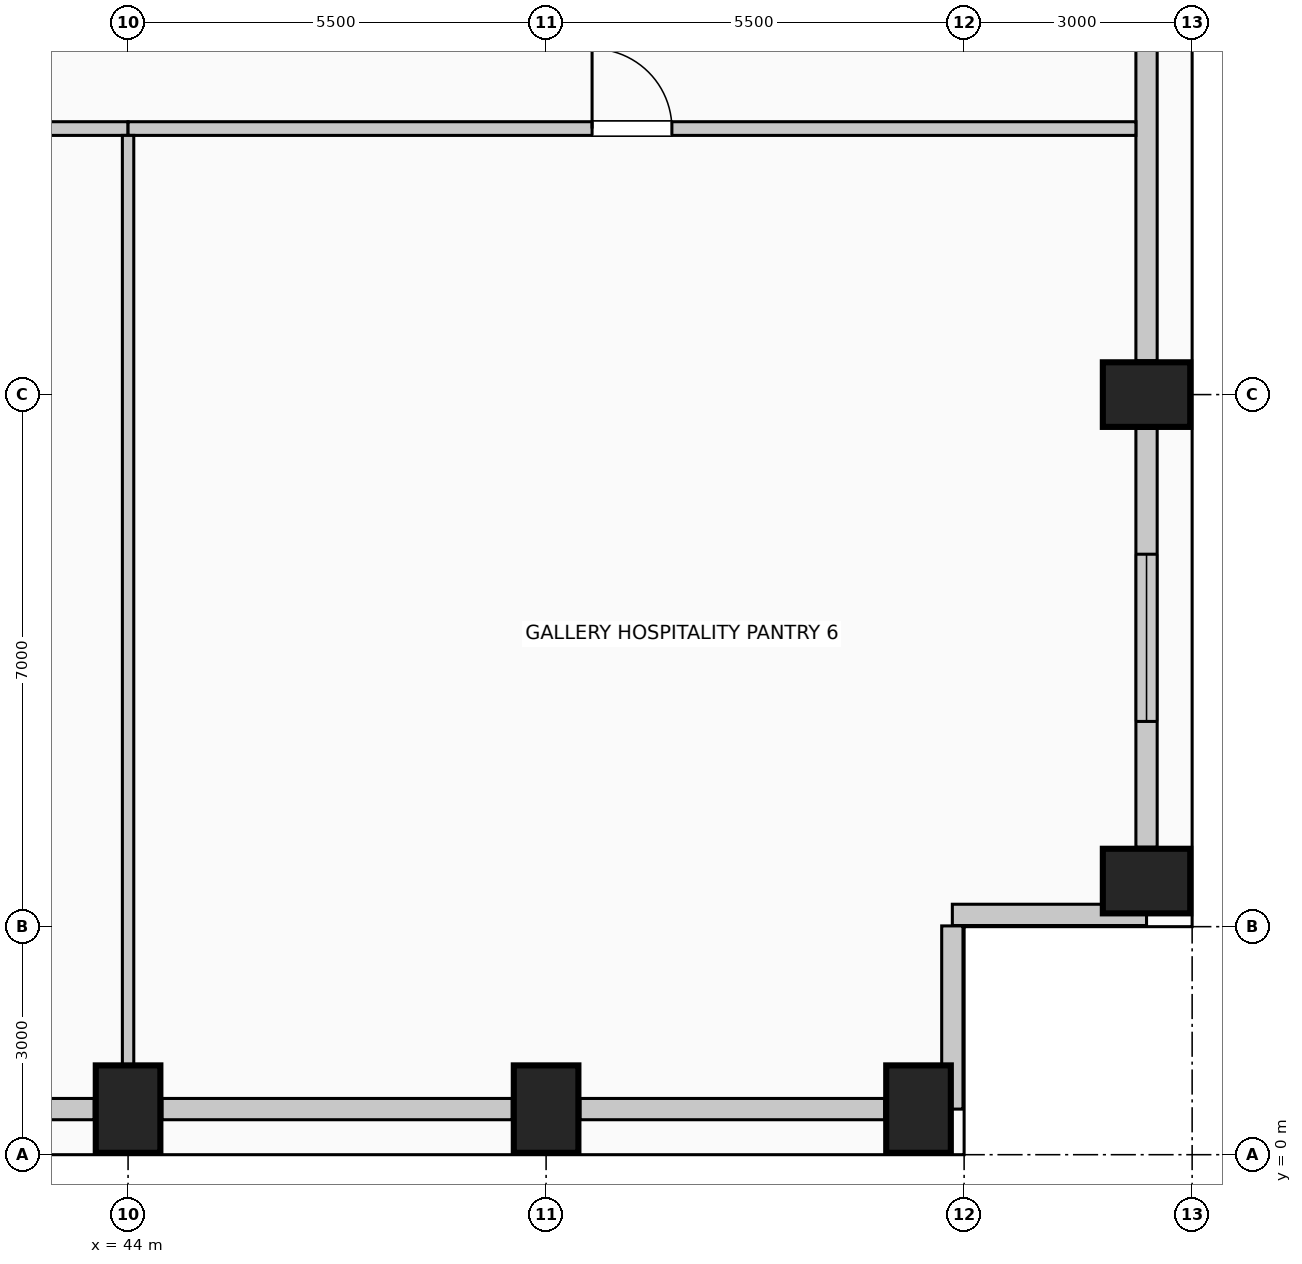
"""IFC4 building model, lengths in metres.
Left out: names, types, materials, properties, quantities, classifications, styles, units other than length and angle.
Written with IfcOpenShell. Run it as: python <this file> out.ifc"""

import sys

from ifc_helpers import new_model, si_unit, direction, frame, frame_2d, origin, origin_2d, place, context, subcontext, project, spatial, rectangle, extrude, element, fill, save


model = new_model("IFC4")
c1 = context("Model", 3, precision=1e-05, world=origin(), true_north=direction((0.0, 1.0)))
c2 = subcontext(c1, "Body", "Model", "MODEL_VIEW")
j1 = project(units=[si_unit("LENGTHUNIT", "METRE"), si_unit("PLANEANGLEUNIT", "RADIAN")], contexts=[c1])
p1 = place(None, origin())
s1 = spatial("IfcSite", under=j1, at=p1, CompositionType="ELEMENT")
p2 = place(p1, origin())
s2 = spatial("IfcBuilding", under=s1, at=p2, CompositionType="ELEMENT")
p3 = place(p2, frame((0.0, 0.0, 140.6)))
s3 = spatial("IfcBuildingStorey", under=s2, at=p3, CompositionType="ELEMENT", Elevation=140.6)
for number, where, z_axis, x_axis in (
    (1, (44.0, 0.6, 0.0), (0.0, 0.0, 1.0), (1.0, 0.0, 0.0)),
    (2, (49.5, 0.6, 0.0), (0.0, 0.0, 1.0), (1.0, 0.0, 0.0)),
    (3, (54.4, 0.6, 0.0), (0.0, 0.0, 1.0), (1.0, 0.0, 0.0)),
    (4, (57.4, 3.6, 0.0), (0.0, 0.0, 1.0), (0.0, 1.0, 0.0)),
    (5, (57.4, 10.0, 0.0), (0.0, 0.0, 1.0), (0.0, 1.0, 0.0)),
):
    element("IfcColumn", number, at=place(p3, frame(where, z_axis=z_axis, x_axis=x_axis)), inside=s3, PredefinedType="COLUMN", context=c2, shape_type="SweptSolid", body=[
        extrude(rectangle(XDim=0.85, YDim=1.15, at=origin_2d()), origin(), (0.0, 0.0, 1.0), 4.0),
    ])
p4 = place(p3, frame((43.555, 0.6, 0.0), z_axis=(0.0, 0.0, 1.0), x_axis=(-1.0, 0.0, 0.0)))
e6 = element("IfcWall", 6, at=p4, inside=s3, PredefinedType="SOLIDWALL", context=c2, shape_type="SweptSolid", body=[
    extrude(rectangle(XDim=1.385, YDim=0.28, at=frame_2d((0.692, 0.0))), origin(), (0.0, 0.0, 1.0), 2.875),
])
p5 = place(p3, frame((49.055, 0.6, 0.0), z_axis=(0.0, 0.0, 1.0), x_axis=(-1.0, 0.0, 0.0)))
e7 = element("IfcWall", 7, at=p5, inside=s3, PredefinedType="SOLIDWALL", context=c2, shape_type="SweptSolid", body=[
    extrude(rectangle(XDim=4.61, YDim=0.28, at=frame_2d((2.305, 0.0))), origin(), (0.0, 0.0, 1.0), 2.875),
])
p6 = place(p3, frame((53.955, 0.6, 0.0), z_axis=(0.0, 0.0, 1.0), x_axis=(-1.0, 0.0, 0.0)))
e8 = element("IfcWall", 8, at=p6, inside=s3, PredefinedType="SOLIDWALL", context=c2, shape_type="SweptSolid", body=[
    extrude(rectangle(XDim=4.01, YDim=0.28, at=frame_2d((2.005, 0.0))), origin(), (0.0, 0.0, 1.0), 2.875),
])
p7 = place(p3, frame((57.4, 9.555, 0.0), z_axis=(0.0, 0.0, 1.0), x_axis=(0.0, -1.0, 0.0)))
e9 = element("IfcWall", 9, at=p7, inside=s3, PredefinedType="SOLIDWALL", context=c2, shape_type="SweptSolid", body=[
    extrude(rectangle(XDim=5.51, YDim=0.28, at=frame_2d((2.755, 0.0))), origin(), (0.0, 0.0, 1.0), 2.875),
])
p8 = place(p7, frame((1.655, 0.0, 0.5)))
e10 = element("IfcOpeningElement", 10, at=p8, cuts=e9, PredefinedType="OPENING", context=c2, shape_type="SweptSolid", body=[
    extrude(rectangle(XDim=2.2, YDim=1.95, at=frame_2d((1.1, 0.975))), frame((0.0, 0.15, 0.0), z_axis=(0.0, -1.0, 0.0), x_axis=(1.0, 0.0, 0.0)), (0.0, 0.0, 1.0), 0.3),
])
p9 = place(p3, frame((57.4, 17.555, 0.0), z_axis=(0.0, 0.0, 1.0), x_axis=(0.0, -1.0, 0.0)))
e11 = element("IfcWall", 11, at=p9, inside=s3, PredefinedType="SOLIDWALL", context=c2, shape_type="SweptSolid", body=[
    extrude(rectangle(XDim=7.11, YDim=0.28, at=frame_2d((3.555, 0.0))), origin(), (0.0, 0.0, 1.0), 2.875),
])
p10 = place(p3, frame((57.4, 3.155, 0.0), z_axis=(0.0, 0.0, 1.0), x_axis=(-1.0, 0.0, 0.0)))
e12 = element("IfcWall", 12, at=p10, inside=s3, PredefinedType="SOLIDWALL", context=c2, shape_type="SweptSolid", body=[
    extrude(rectangle(XDim=2.555, YDim=0.28, at=frame_2d((1.277, 0.0))), origin(), (0.0, 0.0, 1.0), 3.725),
])
p11 = place(p3, frame((54.845, 3.01, 0.0), z_axis=(0.0, 0.0, 1.0), x_axis=(0.0, -1.0, 0.0)))
e13 = element("IfcWall", 13, at=p11, inside=s3, PredefinedType="SOLIDWALL", context=c2, shape_type="SweptSolid", body=[
    extrude(rectangle(XDim=2.41, YDim=0.28, at=frame_2d((1.205, 0.0))), origin(), (0.0, 0.0, 1.0), 3.725),
])
p12 = place(p3, frame((34.0, 13.5, 0.0), z_axis=(0.0, 0.0, 1.0), x_axis=(1.0, 0.0, 0.0)))
e14 = element("IfcWall", 14, at=p12, inside=s3, PredefinedType="PARTITIONING", context=c2, shape_type="SweptSolid", body=[
    extrude(rectangle(XDim=10.0, YDim=0.18, at=frame_2d((5.0, 0.0))), origin(), (0.0, 0.0, 1.0), 3.725),
])
p13 = place(p12, frame((4.525, 0.0, 0.0)))
e15 = element("IfcOpeningElement", 15, at=p13, cuts=e14, PredefinedType="OPENING", context=c2, shape_type="SweptSolid", body=[
    extrude(rectangle(XDim=0.95, YDim=2.15, at=frame_2d((0.475, 1.075))), frame((0.0, 0.1, 0.0), z_axis=(0.0, -1.0, 0.0), x_axis=(1.0, 0.0, 0.0)), (0.0, 0.0, 1.0), 0.2),
])
p14 = place(p3, frame((44.0, 13.5, 0.0), z_axis=(0.0, 0.0, 1.0), x_axis=(1.0, 0.0, 0.0)))
e16 = element("IfcWall", 16, at=p14, inside=s3, PredefinedType="PARTITIONING", context=c2, shape_type="SweptSolid", body=[
    extrude(rectangle(XDim=13.26, YDim=0.18, at=frame_2d((6.63, 0.0))), origin(), (0.0, 0.0, 1.0), 3.725),
])
p15 = place(p14, frame((6.105, 0.0, 0.0)))
e17 = element("IfcOpeningElement", 17, at=p15, cuts=e16, PredefinedType="OPENING", context=c2, shape_type="SweptSolid", body=[
    extrude(rectangle(XDim=1.05, YDim=2.15, at=frame_2d((0.525, 1.075))), frame((0.0, 0.1, 0.0), z_axis=(0.0, -1.0, 0.0), x_axis=(1.0, 0.0, 0.0)), (0.0, 0.0, 1.0), 0.2),
])
p16 = place(p3, frame((44.0, 1.175, 0.0), z_axis=(0.0, 0.0, 1.0), x_axis=(0.0, 1.0, 0.0)))
e18 = element("IfcWall", 18, at=p16, inside=s3, PredefinedType="PARTITIONING", context=c2, shape_type="SweptSolid", body=[
    extrude(rectangle(XDim=12.235, YDim=0.15, at=frame_2d((6.117, 0.0))), origin(), (0.0, 0.0, 1.0), 3.725),
])
p17 = place(p8, origin())
e19 = element("IfcWindow", 19, at=p17, inside=s3, PartitioningType="SINGLE_PANEL", PredefinedType="WINDOW", context=c2, shape_type="SweptSolid", body=[
    extrude(rectangle(XDim=2.2, YDim=1.95, at=frame_2d((1.1, 0.975))), frame((0.0, 0.03, 0.0), z_axis=(0.0, -1.0, 0.0), x_axis=(1.0, 0.0, 0.0)), (0.0, 0.0, 1.0), 0.06),
])
fill(e10, e19)
p18 = place(p15, origin())
e20 = element("IfcDoor", 20, at=p18, inside=s3, OperationType="SINGLE_SWING_LEFT", PredefinedType="DOOR", context=c2, shape_type="SweptSolid", body=[
    extrude(rectangle(XDim=1.05, YDim=2.15, at=frame_2d((0.525, 1.075))), frame((0.0, 0.025, 0.0), z_axis=(0.0, -1.0, 0.0), x_axis=(1.0, 0.0, 0.0)), (0.0, 0.0, 1.0), 0.05),
])
fill(e17, e20)
save(model, sys.argv[1])
